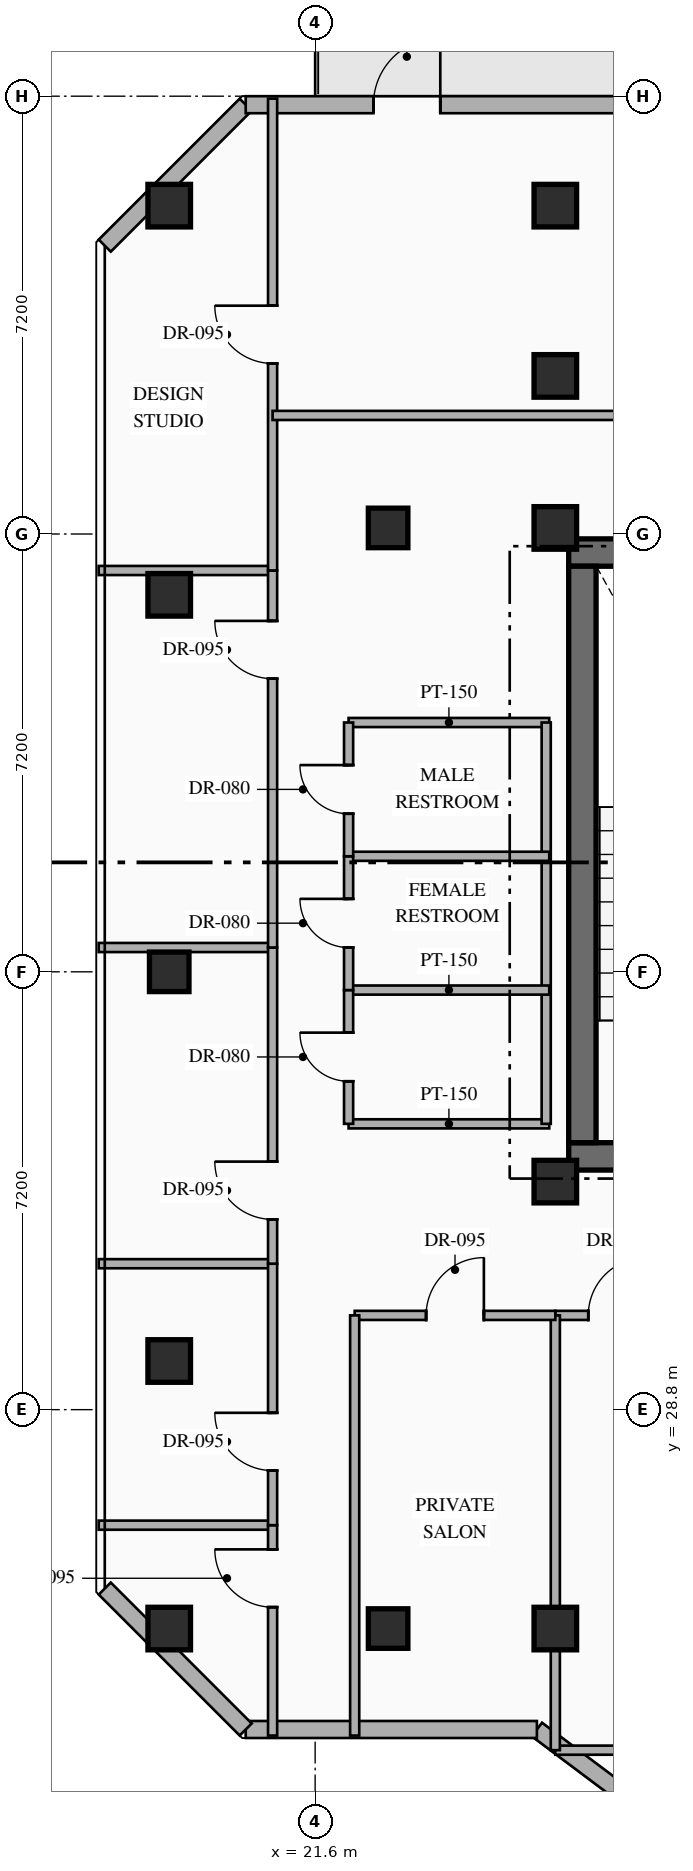
"""IFC4 building model, lengths in metres.
Left out: names, types, materials, properties, quantities, classifications, styles, units other than length and angle.
Written with IfcOpenShell. Run it as: python <this file> out.ifc"""

import sys

from ifc_helpers import new_model, si_unit, direction, frame, frame_2d, origin, origin_2d, place, context, subcontext, project, spatial, rectangle, hollow_rectangle, extrude, element, fill, save


model = new_model("IFC4")
c1 = context("Model", 3, precision=1e-05, world=origin(), true_north=direction((0.0, 1.0)))
c2 = subcontext(c1, "Body", "Model", "MODEL_VIEW")
j1 = project(units=[si_unit("LENGTHUNIT", "METRE"), si_unit("PLANEANGLEUNIT", "RADIAN")], contexts=[c1])
p1 = place(None, origin())
s1 = spatial("IfcSite", under=j1, at=p1, CompositionType="ELEMENT")
p2 = place(p1, origin())
s2 = spatial("IfcBuilding", under=s1, at=p2, CompositionType="ELEMENT")
p3 = place(p2, frame((0.0, 0.0, 227.55)))
s3 = spatial("IfcBuildingStorey", under=s2, at=p3, CompositionType="ELEMENT", Elevation=227.55)
p4 = place(p3, frame((25.77, 32.965, 0.0), z_axis=(0.0, 0.0, 1.0), x_axis=(1.0, 0.0, 0.0)))
e1 = element("IfcWall", 1, at=p4, inside=s3, PredefinedType="SHEAR", context=c2, shape_type="SweptSolid", body=[
    extrude(rectangle(XDim=7.48, YDim=0.45, at=frame_2d((3.74, 0.0))), origin(), (0.0, 0.0, 1.0), 3.6),
])
p5 = place(p4, frame((2.68, 0.0, 0.0)))
e2 = element("IfcOpeningElement", 2, at=p5, cuts=e1, PredefinedType="OPENING", context=c2, shape_type="SweptSolid", body=[
    extrude(rectangle(XDim=1.1, YDim=2.2, at=frame_2d((0.55, 1.1))), frame((0.0, 0.235, 0.0), z_axis=(0.0, -1.0, 0.0), x_axis=(1.0, 0.0, 0.0)), (0.0, 0.0, 1.0), 0.47),
])
p6 = place(p4, frame((5.43, 0.0, 0.0)))
e3 = element("IfcOpeningElement", 3, at=p6, cuts=e1, PredefinedType="OPENING", context=c2, shape_type="SweptSolid", body=[
    extrude(rectangle(XDim=1.1, YDim=2.15, at=frame_2d((0.55, 1.075))), frame((0.0, 0.235, 0.0), z_axis=(0.0, -1.0, 0.0), x_axis=(1.0, 0.0, 0.0)), (0.0, 0.0, 1.0), 0.47),
])
p7 = place(p3, frame((25.77, 42.895, 0.0), z_axis=(0.0, 0.0, 1.0), x_axis=(1.0, 0.0, 0.0)))
e4 = element("IfcWall", 4, at=p7, inside=s3, PredefinedType="SHEAR", context=c2, shape_type="SweptSolid", body=[
    extrude(rectangle(XDim=7.48, YDim=0.45, at=frame_2d((3.74, 0.0))), origin(), (0.0, 0.0, 1.0), 3.6),
])
p8 = place(p3, frame((25.995, 33.19, 0.0), z_axis=(0.0, 0.0, 1.0), x_axis=(0.0, 1.0, 0.0)))
e5 = element("IfcWall", 5, at=p8, inside=s3, PredefinedType="SHEAR", context=c2, shape_type="SweptSolid", body=[
    extrude(rectangle(XDim=9.48, YDim=0.45, at=frame_2d((4.74, 0.0))), origin(), (0.0, 0.0, 1.0), 3.6),
])
for number, where, z_axis, x_axis in (
    (6, (25.55, 32.55, 0.0), (0.0, 0.0, 1.0), (1.0, 0.0, 0.0)),
    (7, (25.55, 43.3, 0.0), (0.0, 0.0, 1.0), (1.0, 0.0, 0.0)),
    (8, (25.55, 25.2, 0.0), (0.0, 0.0, 1.0), (1.0, 0.0, 0.0)),
    (9, (25.55, 45.8, 0.0), (0.0, 0.0, 1.0), (1.0, 0.0, 0.0)),
    (10, (19.2, 48.6, 0.0), (0.0, 0.0, 1.0), (1.0, 0.0, 0.0)),
    (11, (25.55, 48.6, 0.0), (0.0, 0.0, 1.0), (1.0, 0.0, 0.0)),
    (12, (19.2, 25.2, 0.0), (0.0, 0.0, 1.0), (1.0, 0.0, 0.0)),
    (13, (19.2, 29.6, 0.0), (0.0, 0.0, 1.0), (1.0, 0.0, 0.0)),
    (14, (19.2, 42.2, 0.0), (0.0, 0.0, 1.0), (1.0, 0.0, 0.0)),
):
    element("IfcColumn", number, at=place(p3, frame(where, z_axis=z_axis, x_axis=x_axis)), inside=s3, PredefinedType="COLUMN", context=c2, shape_type="SweptSolid", body=[
        extrude(hollow_rectangle(XDim=0.7, YDim=0.7, WallThickness=0.028, at=origin_2d()), origin(), (0.0, 0.0, 1.0), 3.6),
    ])
for number, where, z_axis, x_axis in (
    (15, (22.8, 25.2, 0.0), (0.0, 0.0, 1.0), (1.0, 0.0, 0.0)),
    (16, (22.8, 43.3, 0.0), (0.0, 0.0, 1.0), (1.0, 0.0, 0.0)),
    (17, (19.2, 36.0, 0.0), (0.0, 0.0, 1.0), (1.0, 0.0, 0.0)),
):
    element("IfcColumn", number, at=place(p3, frame(where, z_axis=z_axis, x_axis=x_axis)), inside=s3, PredefinedType="COLUMN", context=c2, shape_type="SweptSolid", body=[
        extrude(hollow_rectangle(XDim=0.65, YDim=0.65, WallThickness=0.025, at=origin_2d()), origin(), (0.0, 0.0, 1.0), 3.6),
    ])
p9 = place(p3, frame((44.918, 8.787, 0.0), z_axis=(0.0, 0.0, 1.0), x_axis=(-0.800004765927, 0.599993645378, 0.0)))
e18 = element("IfcWall", 18, at=p9, inside=s3, PredefinedType="STANDARD", context=c2, shape_type="SweptSolid", body=[
    extrude(rectangle(XDim=24.588, YDim=0.28, at=frame_2d((12.294, 0.0))), origin(), (0.0, 0.0, 1.0), 3.35),
])
p10 = place(p3, frame((25.247, 23.54, 0.0), z_axis=(0.0, 0.0, 1.0), x_axis=(-1.0, 0.0, 0.0)))
e19 = element("IfcWall", 19, at=p10, inside=s3, PredefinedType="STANDARD", context=c2, shape_type="SweptSolid", body=[
    extrude(rectangle(XDim=4.789, YDim=0.28, at=frame_2d((2.395, 0.0))), origin(), (0.0, 0.0, 1.0), 3.35),
])
p11 = place(p3, frame((20.458, 23.54, 0.0), z_axis=(0.0, 0.0, 1.0), x_axis=(-0.707144017911, 0.707069542501, 0.0)))
e20 = element("IfcWall", 20, at=p11, inside=s3, PredefinedType="STANDARD", context=c2, shape_type="SweptSolid", body=[
    extrude(rectangle(XDim=3.278, YDim=0.28, at=frame_2d((1.639, 0.0))), origin(), (0.0, 0.0, 1.0), 3.35),
])
p12 = place(p3, frame((18.14, 47.942, 0.0), z_axis=(0.0, 0.0, 1.0), x_axis=(0.707106781187, 0.707106781187, 0.0)))
e21 = element("IfcWall", 21, at=p12, inside=s3, PredefinedType="STANDARD", context=c2, shape_type="SweptSolid", body=[
    extrude(rectangle(XDim=3.278, YDim=0.28, at=frame_2d((1.639, 0.0))), origin(), (0.0, 0.0, 1.0), 3.35),
])
p13 = place(p3, frame((20.458, 50.26, 0.0), z_axis=(0.0, 0.0, 1.0), x_axis=(1.0, 0.0, 0.0)))
e22 = element("IfcWall", 22, at=p13, inside=s3, PredefinedType="STANDARD", context=c2, shape_type="SweptSolid", body=[
    extrude(rectangle(XDim=22.084, YDim=0.28, at=frame_2d((11.042, 0.0))), origin(), (0.0, 0.0, 1.0), 3.35),
])
p14 = place(p13, frame((2.1, 0.0, 0.0)))
e23 = element("IfcOpeningElement", 23, at=p14, cuts=e22, PredefinedType="OPENING", context=c2, shape_type="SweptSolid", body=[
    extrude(rectangle(XDim=1.1, YDim=2.2, at=frame_2d((0.55, 1.1))), frame((0.0, 0.15, 0.0), z_axis=(0.0, -1.0, 0.0), x_axis=(1.0, 0.0, 0.0)), (0.0, 0.0, 1.0), 0.3),
])
p15 = place(p13, frame((15.663, 0.0, 0.85)))
e24 = element("IfcOpeningElement", 24, at=p15, cuts=e22, PredefinedType="OPENING", context=c2, shape_type="SweptSolid", body=[
    extrude(rectangle(XDim=1.8, YDim=2.1, at=frame_2d((0.9, 1.05))), frame((0.0, 0.15, 0.0), z_axis=(0.0, -1.0, 0.0), x_axis=(1.0, 0.0, 0.0)), (0.0, 0.0, 1.0), 0.3),
])
for number, where, z_axis, x_axis in (
    (25, (22.15, 33.5, 0.0), (0.0, 0.0, 1.0), (1.0, 0.0, 0.0)),
    (26, (22.15, 40.1, 0.0), (0.0, 0.0, 1.0), (1.0, 0.0, 0.0)),
):
    element("IfcWall", number, at=place(p3, frame(where, z_axis=z_axis, x_axis=x_axis)), inside=s3, PredefinedType="PARTITIONING", context=c2, shape_type="SweptSolid", body=[
        extrude(rectangle(XDim=3.3, YDim=0.15, at=frame_2d((1.65, 0.0))), origin(), (0.0, 0.0, 1.0), 3.35),
    ])
p16 = place(p3, frame((25.4, 33.5, 0.0), z_axis=(0.0, 0.0, 1.0), x_axis=(0.0, 1.0, 0.0)))
e27 = element("IfcWall", 27, at=p16, inside=s3, PredefinedType="PARTITIONING", context=c2, shape_type="SweptSolid", body=[
    extrude(rectangle(XDim=6.6, YDim=0.15, at=frame_2d((3.3, 0.0))), origin(), (0.0, 0.0, 1.0), 3.35),
])
for number, where, z_axis, x_axis in (
    (28, (22.15, 35.7, 0.0), (0.0, 0.0, 1.0), (1.0, 0.0, 0.0)),
    (29, (22.15, 37.9, 0.0), (0.0, 0.0, 1.0), (1.0, 0.0, 0.0)),
):
    element("IfcWall", number, at=place(p3, frame(where, z_axis=z_axis, x_axis=x_axis)), inside=s3, PredefinedType="PARTITIONING", context=c2, shape_type="SweptSolid", body=[
        extrude(rectangle(XDim=3.3, YDim=0.15, at=frame_2d((1.65, 0.0))), origin(), (0.0, 0.0, 1.0), 3.35),
    ])
p17 = place(p3, frame((22.15, 33.5, 0.0), z_axis=(0.0, 0.0, 1.0), x_axis=(0.0, 1.0, 0.0)))
e30 = element("IfcWall", 30, at=p17, inside=s3, PredefinedType="PARTITIONING", context=c2, shape_type="SweptSolid", body=[
    extrude(rectangle(XDim=2.2, YDim=0.15, at=frame_2d((1.1, 0.0))), origin(), (0.0, 0.0, 1.0), 3.35),
])
p18 = place(p17, frame((0.7, 0.0, 0.0)))
e31 = element("IfcOpeningElement", 31, at=p18, cuts=e30, PredefinedType="OPENING", context=c2, shape_type="SweptSolid", body=[
    extrude(rectangle(XDim=0.8, YDim=2.06, at=frame_2d((0.4, 1.03))), frame((0.0, 0.085, 0.0), z_axis=(0.0, -1.0, 0.0), x_axis=(1.0, 0.0, 0.0)), (0.0, 0.0, 1.0), 0.17),
])
p19 = place(p3, frame((22.15, 35.7, 0.0), z_axis=(0.0, 0.0, 1.0), x_axis=(0.0, 1.0, 0.0)))
e32 = element("IfcWall", 32, at=p19, inside=s3, PredefinedType="PARTITIONING", context=c2, shape_type="SweptSolid", body=[
    extrude(rectangle(XDim=2.2, YDim=0.15, at=frame_2d((1.1, 0.0))), origin(), (0.0, 0.0, 1.0), 3.35),
])
p20 = place(p19, frame((0.7, 0.0, 0.0)))
e33 = element("IfcOpeningElement", 33, at=p20, cuts=e32, PredefinedType="OPENING", context=c2, shape_type="SweptSolid", body=[
    extrude(rectangle(XDim=0.8, YDim=2.06, at=frame_2d((0.4, 1.03))), frame((0.0, 0.085, 0.0), z_axis=(0.0, -1.0, 0.0), x_axis=(1.0, 0.0, 0.0)), (0.0, 0.0, 1.0), 0.17),
])
p21 = place(p3, frame((22.15, 37.9, 0.0), z_axis=(0.0, 0.0, 1.0), x_axis=(0.0, 1.0, 0.0)))
e34 = element("IfcWall", 34, at=p21, inside=s3, PredefinedType="PARTITIONING", context=c2, shape_type="SweptSolid", body=[
    extrude(rectangle(XDim=2.2, YDim=0.15, at=frame_2d((1.1, 0.0))), origin(), (0.0, 0.0, 1.0), 3.35),
])
p22 = place(p21, frame((0.7, 0.0, 0.0)))
e35 = element("IfcOpeningElement", 35, at=p22, cuts=e34, PredefinedType="OPENING", context=c2, shape_type="SweptSolid", body=[
    extrude(rectangle(XDim=0.8, YDim=2.06, at=frame_2d((0.4, 1.03))), frame((0.0, 0.085, 0.0), z_axis=(0.0, -1.0, 0.0), x_axis=(1.0, 0.0, 0.0)), (0.0, 0.0, 1.0), 0.17),
])
p23 = place(p3, frame((25.55, 23.2, 0.0), z_axis=(0.0, 0.0, 1.0), x_axis=(1.0, 0.0, 0.0)))
e36 = element("IfcWall", 36, at=p23, inside=s3, PredefinedType="PARTITIONING", context=c2, shape_type="SweptSolid", body=[
    extrude(rectangle(XDim=4.95, YDim=0.15, at=frame_2d((2.475, 0.0))), origin(), (0.0, 0.0, 1.0), 3.35),
])
p24 = place(p3, frame((25.55, 30.35, 0.0), z_axis=(0.0, 0.0, 1.0), x_axis=(1.0, 0.0, 0.0)))
e37 = element("IfcWall", 37, at=p24, inside=s3, PredefinedType="PARTITIONING", context=c2, shape_type="SweptSolid", body=[
    extrude(rectangle(XDim=4.95, YDim=0.15, at=frame_2d((2.475, 0.0))), origin(), (0.0, 0.0, 1.0), 3.35),
])
p25 = place(p24, frame((0.542, 0.0, 0.0)))
e38 = element("IfcOpeningElement", 38, at=p25, cuts=e37, PredefinedType="OPENING", context=c2, shape_type="SweptSolid", body=[
    extrude(rectangle(XDim=0.95, YDim=2.15, at=frame_2d((0.475, 1.075))), frame((0.0, 0.085, 0.0), z_axis=(0.0, -1.0, 0.0), x_axis=(1.0, 0.0, 0.0)), (0.0, 0.0, 1.0), 0.17),
])
p26 = place(p3, frame((25.55, 23.2, 0.0), z_axis=(0.0, 0.0, 1.0), x_axis=(0.0, 1.0, 0.0)))
e39 = element("IfcWall", 39, at=p26, inside=s3, PredefinedType="PARTITIONING", context=c2, shape_type="SweptSolid", body=[
    extrude(rectangle(XDim=7.15, YDim=0.15, at=frame_2d((3.575, 0.0))), origin(), (0.0, 0.0, 1.0), 2.757),
])
p27 = place(p3, frame((18.04, 26.9, 0.0), z_axis=(0.0, 0.0, 1.0), x_axis=(1.0, 0.0, 0.0)))
e40 = element("IfcWall", 40, at=p27, inside=s3, PredefinedType="PARTITIONING", context=c2, shape_type="SweptSolid", body=[
    extrude(rectangle(XDim=2.86, YDim=0.15, at=frame_2d((1.43, 0.0))), origin(), (0.0, 0.0, 1.0), 3.35),
])
p28 = place(p3, frame((20.9, 23.44, 0.0), z_axis=(0.0, 0.0, 1.0), x_axis=(0.0, 1.0, 0.0)))
e41 = element("IfcWall", 41, at=p28, inside=s3, PredefinedType="PARTITIONING", context=c2, shape_type="SweptSolid", body=[
    extrude(rectangle(XDim=3.46, YDim=0.15, at=frame_2d((1.73, 0.0))), origin(), (0.0, 0.0, 1.0), 3.35),
])
p29 = place(p28, frame((2.112, 0.0, 0.0)))
e42 = element("IfcOpeningElement", 42, at=p29, cuts=e41, PredefinedType="OPENING", context=c2, shape_type="SweptSolid", body=[
    extrude(rectangle(XDim=0.95, YDim=2.15, at=frame_2d((0.475, 1.075))), frame((0.0, 0.085, 0.0), z_axis=(0.0, -1.0, 0.0), x_axis=(1.0, 0.0, 0.0)), (0.0, 0.0, 1.0), 0.17),
])
p30 = place(p3, frame((18.04, 31.2, 0.0), z_axis=(0.0, 0.0, 1.0), x_axis=(1.0, 0.0, 0.0)))
e43 = element("IfcWall", 43, at=p30, inside=s3, PredefinedType="PARTITIONING", context=c2, shape_type="SweptSolid", body=[
    extrude(rectangle(XDim=2.86, YDim=0.15, at=frame_2d((1.43, 0.0))), origin(), (0.0, 0.0, 1.0), 3.35),
])
p31 = place(p3, frame((20.9, 26.9, 0.0), z_axis=(0.0, 0.0, 1.0), x_axis=(0.0, 1.0, 0.0)))
e44 = element("IfcWall", 44, at=p31, inside=s3, PredefinedType="PARTITIONING", context=c2, shape_type="SweptSolid", body=[
    extrude(rectangle(XDim=4.3, YDim=0.15, at=frame_2d((2.15, 0.0))), origin(), (0.0, 0.0, 1.0), 3.35),
])
p32 = place(p31, frame((0.898, 0.0, 0.0)))
e45 = element("IfcOpeningElement", 45, at=p32, cuts=e44, PredefinedType="OPENING", context=c2, shape_type="SweptSolid", body=[
    extrude(rectangle(XDim=0.95, YDim=2.15, at=frame_2d((0.475, 1.075))), frame((0.0, 0.085, 0.0), z_axis=(0.0, -1.0, 0.0), x_axis=(1.0, 0.0, 0.0)), (0.0, 0.0, 1.0), 0.17),
])
p33 = place(p3, frame((18.04, 36.4, 0.0), z_axis=(0.0, 0.0, 1.0), x_axis=(1.0, 0.0, 0.0)))
e46 = element("IfcWall", 46, at=p33, inside=s3, PredefinedType="PARTITIONING", context=c2, shape_type="SweptSolid", body=[
    extrude(rectangle(XDim=2.86, YDim=0.15, at=frame_2d((1.43, 0.0))), origin(), (0.0, 0.0, 1.0), 3.35),
])
p34 = place(p3, frame((20.9, 31.2, 0.0), z_axis=(0.0, 0.0, 1.0), x_axis=(0.0, 1.0, 0.0)))
e47 = element("IfcWall", 47, at=p34, inside=s3, PredefinedType="PARTITIONING", context=c2, shape_type="SweptSolid", body=[
    extrude(rectangle(XDim=5.2, YDim=0.15, at=frame_2d((2.6, 0.0))), origin(), (0.0, 0.0, 1.0), 3.35),
])
p35 = place(p34, frame((0.729, 0.0, 0.0)))
e48 = element("IfcOpeningElement", 48, at=p35, cuts=e47, PredefinedType="OPENING", context=c2, shape_type="SweptSolid", body=[
    extrude(rectangle(XDim=0.95, YDim=2.15, at=frame_2d((0.475, 1.075))), frame((0.0, 0.085, 0.0), z_axis=(0.0, -1.0, 0.0), x_axis=(1.0, 0.0, 0.0)), (0.0, 0.0, 1.0), 0.17),
])
p36 = place(p3, frame((18.04, 42.6, 0.0), z_axis=(0.0, 0.0, 1.0), x_axis=(1.0, 0.0, 0.0)))
e49 = element("IfcWall", 49, at=p36, inside=s3, PredefinedType="PARTITIONING", context=c2, shape_type="SweptSolid", body=[
    extrude(rectangle(XDim=2.86, YDim=0.15, at=frame_2d((1.43, 0.0))), origin(), (0.0, 0.0, 1.0), 3.35),
])
p37 = place(p3, frame((20.9, 36.4, 0.0), z_axis=(0.0, 0.0, 1.0), x_axis=(0.0, 1.0, 0.0)))
e50 = element("IfcWall", 50, at=p37, inside=s3, PredefinedType="PARTITIONING", context=c2, shape_type="SweptSolid", body=[
    extrude(rectangle(XDim=6.2, YDim=0.15, at=frame_2d((3.1, 0.0))), origin(), (0.0, 0.0, 1.0), 3.35),
])
p38 = place(p37, frame((4.421, 0.0, 0.0)))
e51 = element("IfcOpeningElement", 51, at=p38, cuts=e50, PredefinedType="OPENING", context=c2, shape_type="SweptSolid", body=[
    extrude(rectangle(XDim=0.95, YDim=2.15, at=frame_2d((0.475, 1.075))), frame((0.0, 0.085, 0.0), z_axis=(0.0, -1.0, 0.0), x_axis=(1.0, 0.0, 0.0)), (0.0, 0.0, 1.0), 0.17),
])
p39 = place(p3, frame((20.9, 42.6, 0.0), z_axis=(0.0, 0.0, 1.0), x_axis=(0.0, 1.0, 0.0)))
e52 = element("IfcWall", 52, at=p39, inside=s3, PredefinedType="PARTITIONING", context=c2, shape_type="SweptSolid", body=[
    extrude(rectangle(XDim=7.76, YDim=0.15, at=frame_2d((3.88, 0.0))), origin(), (0.0, 0.0, 1.0), 3.35),
])
p40 = place(p39, frame((3.405, 0.0, 0.0)))
e53 = element("IfcOpeningElement", 53, at=p40, cuts=e52, PredefinedType="OPENING", context=c2, shape_type="SweptSolid", body=[
    extrude(rectangle(XDim=0.95, YDim=2.15, at=frame_2d((0.475, 1.075))), frame((0.0, 0.085, 0.0), z_axis=(0.0, -1.0, 0.0), x_axis=(1.0, 0.0, 0.0)), (0.0, 0.0, 1.0), 0.17),
])
p41 = place(p3, frame((20.9, 45.15, 0.0), z_axis=(0.0, 0.0, 1.0), x_axis=(1.0, 0.0, 0.0)))
e54 = element("IfcWall", 54, at=p41, inside=s3, PredefinedType="PARTITIONING", context=c2, shape_type="SweptSolid", body=[
    extrude(rectangle(XDim=24.06, YDim=0.15, at=frame_2d((12.03, 0.0))), origin(), (0.0, 0.0, 1.0), 3.35),
])
p42 = place(p41, frame((9.32, 0.0, 0.0)))
e55 = element("IfcOpeningElement", 55, at=p42, cuts=e54, PredefinedType="OPENING", context=c2, shape_type="SweptSolid", body=[
    extrude(rectangle(XDim=0.95, YDim=2.15, at=frame_2d((0.475, 1.075))), frame((0.0, 0.085, 0.0), z_axis=(0.0, -1.0, 0.0), x_axis=(1.0, 0.0, 0.0)), (0.0, 0.0, 1.0), 0.17),
])
p43 = place(p3, frame((22.25, 30.35, 0.0), z_axis=(0.0, 0.0, 1.0), x_axis=(1.0, 0.0, 0.0)))
e56 = element("IfcWall", 56, at=p43, inside=s3, PredefinedType="PARTITIONING", context=c2, shape_type="SweptSolid", body=[
    extrude(rectangle(XDim=3.3, YDim=0.15, at=frame_2d((1.65, 0.0))), origin(), (0.0, 0.0, 1.0), 3.35),
])
p44 = place(p43, frame((1.175, 0.0, 0.0)))
e57 = element("IfcOpeningElement", 57, at=p44, cuts=e56, PredefinedType="OPENING", context=c2, shape_type="SweptSolid", body=[
    extrude(rectangle(XDim=0.95, YDim=2.15, at=frame_2d((0.475, 1.075))), frame((0.0, 0.085, 0.0), z_axis=(0.0, -1.0, 0.0), x_axis=(1.0, 0.0, 0.0)), (0.0, 0.0, 1.0), 0.17),
])
p45 = place(p3, frame((22.25, 23.44, 0.0), z_axis=(0.0, 0.0, 1.0), x_axis=(0.0, 1.0, 0.0)))
e58 = element("IfcWall", 58, at=p45, inside=s3, PredefinedType="PARTITIONING", context=c2, shape_type="SweptSolid", body=[
    extrude(rectangle(XDim=6.91, YDim=0.15, at=frame_2d((3.455, 0.0))), origin(), (0.0, 0.0, 1.0), 3.35),
])
p46 = place(p14, origin())
e59 = element("IfcDoor", 59, at=p46, inside=s3, OperationType="SINGLE_SWING_RIGHT", PredefinedType="DOOR", context=c2, shape_type="SweptSolid", body=[
    extrude(rectangle(XDim=1.1, YDim=2.2, at=frame_2d((0.55, 1.1))), frame((0.0, 0.025, 0.0), z_axis=(0.0, -1.0, 0.0), x_axis=(1.0, 0.0, 0.0)), (0.0, 0.0, 1.0), 0.05),
])
fill(e23, e59)
p47 = place(p18, origin())
e60 = element("IfcDoor", 60, at=p47, inside=s3, OperationType="SINGLE_SWING_RIGHT", PredefinedType="DOOR", context=c2, shape_type="SweptSolid", body=[
    extrude(rectangle(XDim=0.8, YDim=2.06, at=frame_2d((0.4, 1.03))), frame((0.0, 0.025, 0.0), z_axis=(0.0, -1.0, 0.0), x_axis=(1.0, 0.0, 0.0)), (0.0, 0.0, 1.0), 0.05),
])
fill(e31, e60)
p48 = place(p20, origin())
e61 = element("IfcDoor", 61, at=p48, inside=s3, OperationType="SINGLE_SWING_RIGHT", PredefinedType="DOOR", context=c2, shape_type="SweptSolid", body=[
    extrude(rectangle(XDim=0.8, YDim=2.06, at=frame_2d((0.4, 1.03))), frame((0.0, 0.025, 0.0), z_axis=(0.0, -1.0, 0.0), x_axis=(1.0, 0.0, 0.0)), (0.0, 0.0, 1.0), 0.05),
])
fill(e33, e61)
p49 = place(p22, origin())
e62 = element("IfcDoor", 62, at=p49, inside=s3, OperationType="SINGLE_SWING_RIGHT", PredefinedType="DOOR", context=c2, shape_type="SweptSolid", body=[
    extrude(rectangle(XDim=0.8, YDim=2.06, at=frame_2d((0.4, 1.03))), frame((0.0, 0.025, 0.0), z_axis=(0.0, -1.0, 0.0), x_axis=(1.0, 0.0, 0.0)), (0.0, 0.0, 1.0), 0.05),
])
fill(e35, e62)
p50 = place(p25, origin())
e63 = element("IfcDoor", 63, at=p50, inside=s3, OperationType="SINGLE_SWING_RIGHT", PredefinedType="DOOR", context=c2, shape_type="SweptSolid", body=[
    extrude(rectangle(XDim=0.95, YDim=2.15, at=frame_2d((0.475, 1.075))), frame((0.0, 0.025, 0.0), z_axis=(0.0, -1.0, 0.0), x_axis=(1.0, 0.0, 0.0)), (0.0, 0.0, 1.0), 0.05),
])
fill(e38, e63)
p51 = place(p29, origin())
e64 = element("IfcDoor", 64, at=p51, inside=s3, OperationType="SINGLE_SWING_RIGHT", PredefinedType="DOOR", context=c2, shape_type="SweptSolid", body=[
    extrude(rectangle(XDim=0.95, YDim=2.15, at=frame_2d((0.475, 1.075))), frame((0.0, 0.025, 0.0), z_axis=(0.0, -1.0, 0.0), x_axis=(1.0, 0.0, 0.0)), (0.0, 0.0, 1.0), 0.05),
])
fill(e42, e64)
p52 = place(p32, origin())
e65 = element("IfcDoor", 65, at=p52, inside=s3, OperationType="SINGLE_SWING_RIGHT", PredefinedType="DOOR", context=c2, shape_type="SweptSolid", body=[
    extrude(rectangle(XDim=0.95, YDim=2.15, at=frame_2d((0.475, 1.075))), frame((0.0, 0.025, 0.0), z_axis=(0.0, -1.0, 0.0), x_axis=(1.0, 0.0, 0.0)), (0.0, 0.0, 1.0), 0.05),
])
fill(e45, e65)
p53 = place(p35, origin())
e66 = element("IfcDoor", 66, at=p53, inside=s3, OperationType="SINGLE_SWING_RIGHT", PredefinedType="DOOR", context=c2, shape_type="SweptSolid", body=[
    extrude(rectangle(XDim=0.95, YDim=2.15, at=frame_2d((0.475, 1.075))), frame((0.0, 0.025, 0.0), z_axis=(0.0, -1.0, 0.0), x_axis=(1.0, 0.0, 0.0)), (0.0, 0.0, 1.0), 0.05),
])
fill(e48, e66)
p54 = place(p38, origin())
e67 = element("IfcDoor", 67, at=p54, inside=s3, OperationType="SINGLE_SWING_RIGHT", PredefinedType="DOOR", context=c2, shape_type="SweptSolid", body=[
    extrude(rectangle(XDim=0.95, YDim=2.15, at=frame_2d((0.475, 1.075))), frame((0.0, 0.025, 0.0), z_axis=(0.0, -1.0, 0.0), x_axis=(1.0, 0.0, 0.0)), (0.0, 0.0, 1.0), 0.05),
])
fill(e51, e67)
p55 = place(p40, origin())
e68 = element("IfcDoor", 68, at=p55, inside=s3, OperationType="SINGLE_SWING_RIGHT", PredefinedType="DOOR", context=c2, shape_type="SweptSolid", body=[
    extrude(rectangle(XDim=0.95, YDim=2.15, at=frame_2d((0.475, 1.075))), frame((0.0, 0.025, 0.0), z_axis=(0.0, -1.0, 0.0), x_axis=(1.0, 0.0, 0.0)), (0.0, 0.0, 1.0), 0.05),
])
fill(e53, e68)
p56 = place(p44, origin())
e69 = element("IfcDoor", 69, at=p56, inside=s3, OperationType="SINGLE_SWING_RIGHT", PredefinedType="DOOR", context=c2, shape_type="SweptSolid", body=[
    extrude(rectangle(XDim=0.95, YDim=2.15, at=frame_2d((0.475, 1.075))), frame((0.0, 0.025, 0.0), z_axis=(0.0, -1.0, 0.0), x_axis=(1.0, 0.0, 0.0)), (0.0, 0.0, 1.0), 0.05),
])
fill(e57, e69)
save(model, sys.argv[1])
